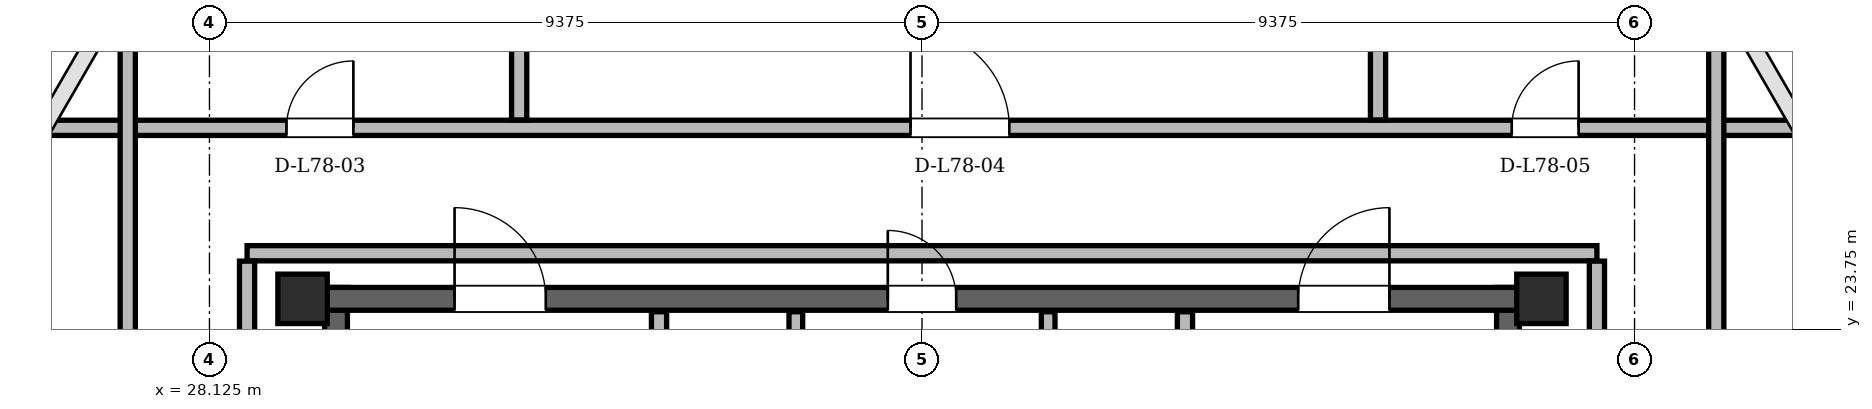
"""IFC4 building model, lengths in metres.
Left out: names, types, materials, properties, quantities, classifications, styles, units other than length and angle.
Written with IfcOpenShell. Run it as: python <this file> out.ifc"""

import sys

from ifc_helpers import new_model, si_unit, direction, frame, frame_2d, origin, origin_2d, place, context, subcontext, project, spatial, rectangle, hollow_rectangle, extrude, element, fill, save


model = new_model("IFC4")
c1 = context("Model", 3, precision=1e-05, world=origin(), true_north=direction((0.0, 1.0)))
c2 = subcontext(c1, "Body", "Model", "MODEL_VIEW")
j1 = project(units=[si_unit("LENGTHUNIT", "METRE"), si_unit("PLANEANGLEUNIT", "RADIAN")], contexts=[c1])
p1 = place(None, origin())
s1 = spatial("IfcSite", under=j1, at=p1, CompositionType="ELEMENT")
p2 = place(p1, origin())
s2 = spatial("IfcBuilding", under=s1, at=p2, CompositionType="ELEMENT")
p3 = place(p2, frame((0.0, 0.0, 296.7)))
s3 = spatial("IfcBuildingStorey", under=s2, at=p3, CompositionType="ELEMENT", Elevation=296.7)
for number, where, z_axis, x_axis in (
    (1, (45.65, 24.15, 0.0), (0.0, 0.0, 1.0), (1.0, 0.0, 0.0)),
    (2, (29.35, 24.15, 0.0), (0.0, 0.0, 1.0), (1.0, 0.0, 0.0)),
):
    element("IfcColumn", number, at=place(p3, frame(where, z_axis=z_axis, x_axis=x_axis)), inside=s3, PredefinedType="COLUMN", context=c2, shape_type="SweptSolid", body=[
        extrude(hollow_rectangle(XDim=0.65, YDim=0.65, WallThickness=0.05, at=origin_2d()), origin(), (0.0, 0.0, 1.0), 4.5),
    ])
for number, where, z_axis, x_axis in (
    (3, (29.79, 11.0, 0.0), (0.0, 0.0, 1.0), (0.0, 1.0, 0.0)),
    (4, (45.21, 11.0, 0.0), (0.0, 0.0, 1.0), (0.0, 1.0, 0.0)),
):
    element("IfcWall", number, at=place(p3, frame(where, z_axis=z_axis, x_axis=x_axis)), inside=s3, PredefinedType="SHEAR", context=c2, shape_type="SweptSolid", body=[
        extrude(rectangle(XDim=13.3, YDim=0.3, at=frame_2d((6.65, 0.0))), origin(), (0.0, 0.0, 1.0), 4.28),
    ])
p4 = place(p3, frame((29.65, 24.15, 0.0), z_axis=(0.0, 0.0, 1.0), x_axis=(1.0, 0.0, 0.0)))
e5 = element("IfcWall", 5, at=p4, inside=s3, PredefinedType="SHEAR", context=c2, shape_type="SweptSolid", body=[
    extrude(rectangle(XDim=15.7, YDim=0.3, at=frame_2d((7.85, 0.0))), origin(), (0.0, 0.0, 1.0), 4.28),
])
p5 = place(p4, frame((1.7, 0.0, 0.0)))
e6 = element("IfcOpeningElement", 6, at=p5, cuts=e5, PredefinedType="OPENING", context=c2, shape_type="SweptSolid", body=[
    extrude(rectangle(XDim=1.2, YDim=2.2, at=frame_2d((0.6, 1.1))), frame((0.0, 0.15, 0.0), z_axis=(0.0, -1.0, 0.0), x_axis=(1.0, 0.0, 0.0)), (0.0, 0.0, 1.0), 0.3),
])
p6 = place(p4, frame((12.8, 0.0, 0.0)))
e7 = element("IfcOpeningElement", 7, at=p6, cuts=e5, PredefinedType="OPENING", context=c2, shape_type="SweptSolid", body=[
    extrude(rectangle(XDim=1.2, YDim=2.2, at=frame_2d((0.6, 1.1))), frame((0.0, 0.15, 0.0), z_axis=(0.0, -1.0, 0.0), x_axis=(1.0, 0.0, 0.0)), (0.0, 0.0, 1.0), 0.3),
])
p7 = place(p4, frame((7.4, 0.0, 0.0)))
e8 = element("IfcOpeningElement", 8, at=p7, cuts=e5, PredefinedType="OPENING", context=c2, shape_type="SweptSolid", body=[
    extrude(rectangle(XDim=0.9, YDim=2.05, at=frame_2d((0.45, 1.025))), frame((0.0, 0.15, 0.0), z_axis=(0.0, -1.0, 0.0), x_axis=(1.0, 0.0, 0.0)), (0.0, 0.0, 1.0), 0.3),
])
p8 = place(p3, frame((34.04, 19.48, 0.0), z_axis=(0.0, 0.0, 1.0), x_axis=(0.0, 1.0, 0.0)))
e9 = element("IfcWall", 9, at=p8, inside=s3, PredefinedType="PARTITIONING", context=c2, shape_type="SweptSolid", body=[
    extrude(rectangle(XDim=4.5, YDim=0.2, at=frame_2d((2.25, 0.0))), origin(), (0.0, 0.0, 1.0), 4.28),
])
p9 = place(p8, frame((2.12, 0.0, 0.0)))
e10 = element("IfcOpeningElement", 10, at=p9, cuts=e9, PredefinedType="OPENING", context=c2, shape_type="SweptSolid", body=[
    extrude(rectangle(XDim=1.1, YDim=2.2, at=frame_2d((0.55, 1.1))), frame((0.0, 0.1, 0.0), z_axis=(0.0, -1.0, 0.0), x_axis=(1.0, 0.0, 0.0)), (0.0, 0.0, 1.0), 0.2),
])
p10 = place(p3, frame((35.84, 20.96, 0.0), z_axis=(0.0, 0.0, 1.0), x_axis=(0.0, 1.0, 0.0)))
e11 = element("IfcWall", 11, at=p10, inside=s3, PredefinedType="PARTITIONING", context=c2, shape_type="SweptSolid", body=[
    extrude(rectangle(XDim=3.02, YDim=0.18, at=frame_2d((1.51, 0.0))), origin(), (0.0, 0.0, 1.0), 4.28),
])
p11 = place(p3, frame((40.96, 19.48, 0.0), z_axis=(0.0, 0.0, 1.0), x_axis=(0.0, 1.0, 0.0)))
e12 = element("IfcWall", 12, at=p11, inside=s3, PredefinedType="PARTITIONING", context=c2, shape_type="SweptSolid", body=[
    extrude(rectangle(XDim=4.5, YDim=0.2, at=frame_2d((2.25, 0.0))), origin(), (0.0, 0.0, 1.0), 4.28),
])
p12 = place(p11, frame((2.12, 0.0, 0.0)))
e13 = element("IfcOpeningElement", 13, at=p12, cuts=e12, PredefinedType="OPENING", context=c2, shape_type="SweptSolid", body=[
    extrude(rectangle(XDim=1.1, YDim=2.2, at=frame_2d((0.55, 1.1))), frame((0.0, 0.1, 0.0), z_axis=(0.0, -1.0, 0.0), x_axis=(1.0, 0.0, 0.0)), (0.0, 0.0, 1.0), 0.2),
])
p13 = place(p3, frame((39.16, 20.96, 0.0), z_axis=(0.0, 0.0, 1.0), x_axis=(0.0, 1.0, 0.0)))
e14 = element("IfcWall", 14, at=p13, inside=s3, PredefinedType="PARTITIONING", context=c2, shape_type="SweptSolid", body=[
    extrude(rectangle(XDim=3.02, YDim=0.18, at=frame_2d((1.51, 0.0))), origin(), (0.0, 0.0, 1.0), 4.28),
])
p14 = place(p3, frame((28.62, 24.75, 0.0), z_axis=(0.0, 0.0, 1.0), x_axis=(1.0, 0.0, 0.0)))
e15 = element("IfcWall", 15, at=p14, inside=s3, PredefinedType="PARTITIONING", context=c2, shape_type="SweptSolid", body=[
    extrude(rectangle(XDim=17.76, YDim=0.2, at=frame_2d((8.88, 0.0))), origin(), (0.0, 0.0, 1.0), 3.866),
])
p15 = place(p3, frame((26.007, 26.4, 0.0), z_axis=(0.0, 0.0, 1.0), x_axis=(1.0, 0.0, 0.0)))
e16 = element("IfcWall", 16, at=p15, inside=s3, PredefinedType="PARTITIONING", context=c2, shape_type="SweptSolid", body=[
    extrude(rectangle(XDim=22.987, YDim=0.2, at=frame_2d((11.493, 0.0))), origin(), (0.0, 0.0, 1.0), 3.658),
])
p16 = place(p15, frame((3.132, 0.0, 0.0)))
e17 = element("IfcOpeningElement", 17, at=p16, cuts=e16, PredefinedType="OPENING", context=c2, shape_type="SweptSolid", body=[
    extrude(rectangle(XDim=0.88, YDim=2.08, at=frame_2d((0.44, 1.04))), frame((0.0, 0.1, 0.0), z_axis=(0.0, -1.0, 0.0), x_axis=(1.0, 0.0, 0.0)), (0.0, 0.0, 1.0), 0.2),
])
p17 = place(p15, frame((11.342, 0.0, 0.0)))
e18 = element("IfcOpeningElement", 18, at=p17, cuts=e16, PredefinedType="OPENING", context=c2, shape_type="SweptSolid", body=[
    extrude(rectangle(XDim=1.3, YDim=2.2, at=frame_2d((0.65, 1.1))), frame((0.0, 0.1, 0.0), z_axis=(0.0, -1.0, 0.0), x_axis=(1.0, 0.0, 0.0)), (0.0, 0.0, 1.0), 0.2),
])
p18 = place(p15, frame((19.252, 0.0, 0.0)))
e19 = element("IfcOpeningElement", 19, at=p18, cuts=e16, PredefinedType="OPENING", context=c2, shape_type="SweptSolid", body=[
    extrude(rectangle(XDim=0.88, YDim=2.08, at=frame_2d((0.44, 1.04))), frame((0.0, 0.1, 0.0), z_axis=(0.0, -1.0, 0.0), x_axis=(1.0, 0.0, 0.0)), (0.0, 0.0, 1.0), 0.2),
])
p19 = place(p3, frame((27.05, 8.854, 0.0), z_axis=(0.0, 0.0, 1.0), x_axis=(0.0, 1.0, 0.0)))
e20 = element("IfcWall", 20, at=p19, inside=s3, PredefinedType="PARTITIONING", context=c2, shape_type="SweptSolid", body=[
    extrude(rectangle(XDim=19.303, YDim=0.2, at=frame_2d((9.652, 0.0))), origin(), (0.0, 0.0, 1.0), 3.658),
])
p20 = place(p19, frame((5.396, 0.0, 0.0)))
e21 = element("IfcOpeningElement", 21, at=p20, cuts=e20, PredefinedType="OPENING", context=c2, shape_type="SweptSolid", body=[
    extrude(rectangle(XDim=1.3, YDim=2.2, at=frame_2d((0.65, 1.1))), frame((0.0, 0.1, 0.0), z_axis=(0.0, -1.0, 0.0), x_axis=(1.0, 0.0, 0.0)), (0.0, 0.0, 1.0), 0.2),
])
p21 = place(p19, frame((12.371, 0.0, 0.0)))
e22 = element("IfcOpeningElement", 22, at=p21, cuts=e20, PredefinedType="OPENING", context=c2, shape_type="SweptSolid", body=[
    extrude(rectangle(XDim=1.3, YDim=2.2, at=frame_2d((0.65, 1.1))), frame((0.0, 0.1, 0.0), z_axis=(0.0, -1.0, 0.0), x_axis=(1.0, 0.0, 0.0)), (0.0, 0.0, 1.0), 0.2),
])
p22 = place(p3, frame((28.62, 10.504, 0.0), z_axis=(0.0, 0.0, 1.0), x_axis=(0.0, 1.0, 0.0)))
e23 = element("IfcWall", 23, at=p22, inside=s3, PredefinedType="PARTITIONING", context=c2, shape_type="SweptSolid", body=[
    extrude(rectangle(XDim=14.142, YDim=0.2, at=frame_2d((7.071, 0.0))), origin(), (0.0, 0.0, 1.0), 3.866),
])
p23 = place(p3, frame((32.2, 26.504, 0.0), z_axis=(0.0, 0.0, 1.0), x_axis=(0.0, 1.0, 0.0)))
e24 = element("IfcWall", 24, at=p23, inside=s3, PredefinedType="PARTITIONING", context=c2, shape_type="SweptSolid", body=[
    extrude(rectangle(XDim=6.892, YDim=0.2, at=frame_2d((3.446, 0.0))), origin(), (0.0, 0.0, 1.0), 3.866),
])
p24 = place(p3, frame((43.5, 26.504, 0.0), z_axis=(0.0, 0.0, 1.0), x_axis=(0.0, 1.0, 0.0)))
e25 = element("IfcWall", 25, at=p24, inside=s3, PredefinedType="PARTITIONING", context=c2, shape_type="SweptSolid", body=[
    extrude(rectangle(XDim=3.592, YDim=0.2, at=frame_2d((1.796, 0.0))), origin(), (0.0, 0.0, 1.0), 4.28),
])
p25 = place(p3, frame((46.38, 10.504, 0.0), z_axis=(0.0, 0.0, 1.0), x_axis=(0.0, 1.0, 0.0)))
e26 = element("IfcWall", 26, at=p25, inside=s3, PredefinedType="PARTITIONING", context=c2, shape_type="SweptSolid", body=[
    extrude(rectangle(XDim=14.142, YDim=0.2, at=frame_2d((7.071, 0.0))), origin(), (0.0, 0.0, 1.0), 3.866),
])
p26 = place(p3, frame((47.95, 8.854, 0.0), z_axis=(0.0, 0.0, 1.0), x_axis=(0.0, 1.0, 0.0)))
e27 = element("IfcWall", 27, at=p26, inside=s3, PredefinedType="PARTITIONING", context=c2, shape_type="SweptSolid", body=[
    extrude(rectangle(XDim=19.303, YDim=0.2, at=frame_2d((9.652, 0.0))), origin(), (0.0, 0.0, 1.0), 3.658),
])
p27 = place(p26, frame((3.149, 0.0, 0.0)))
e28 = element("IfcOpeningElement", 28, at=p27, cuts=e27, PredefinedType="OPENING", context=c2, shape_type="SweptSolid", body=[
    extrude(rectangle(XDim=1.3, YDim=2.2, at=frame_2d((0.65, 1.1))), frame((0.0, 0.1, 0.0), z_axis=(0.0, -1.0, 0.0), x_axis=(1.0, 0.0, 0.0)), (0.0, 0.0, 1.0), 0.2),
])
p28 = place(p26, frame((10.27, 0.0, 0.0)))
e29 = element("IfcOpeningElement", 29, at=p28, cuts=e27, PredefinedType="OPENING", context=c2, shape_type="SweptSolid", body=[
    extrude(rectangle(XDim=1.3, YDim=2.2, at=frame_2d((0.65, 1.1))), frame((0.0, 0.1, 0.0), z_axis=(0.0, -1.0, 0.0), x_axis=(1.0, 0.0, 0.0)), (0.0, 0.0, 1.0), 0.2),
])
p29 = place(p5, origin())
e30 = element("IfcDoor", 30, at=p29, inside=s3, OperationType="SINGLE_SWING_LEFT", PredefinedType="DOOR", context=c2, shape_type="SweptSolid", body=[
    extrude(rectangle(XDim=1.2, YDim=2.2, at=frame_2d((0.6, 1.1))), frame((0.0, 0.025, 0.0), z_axis=(0.0, -1.0, 0.0), x_axis=(1.0, 0.0, 0.0)), (0.0, 0.0, 1.0), 0.05),
])
fill(e6, e30)
p30 = place(p6, origin())
e31 = element("IfcDoor", 31, at=p30, inside=s3, OperationType="SINGLE_SWING_RIGHT", PredefinedType="DOOR", context=c2, shape_type="SweptSolid", body=[
    extrude(rectangle(XDim=1.2, YDim=2.2, at=frame_2d((0.6, 1.1))), frame((0.0, 0.025, 0.0), z_axis=(0.0, -1.0, 0.0), x_axis=(1.0, 0.0, 0.0)), (0.0, 0.0, 1.0), 0.05),
])
fill(e7, e31)
p31 = place(p7, origin())
e32 = element("IfcDoor", 32, at=p31, inside=s3, OperationType="SINGLE_SWING_LEFT", PredefinedType="DOOR", context=c2, shape_type="SweptSolid", body=[
    extrude(rectangle(XDim=0.9, YDim=2.05, at=frame_2d((0.45, 1.025))), frame((0.0, 0.025, 0.0), z_axis=(0.0, -1.0, 0.0), x_axis=(1.0, 0.0, 0.0)), (0.0, 0.0, 1.0), 0.05),
])
fill(e8, e32)
p32 = place(p16, origin())
e33 = element("IfcDoor", 33, at=p32, inside=s3, OperationType="SINGLE_SWING_RIGHT", PredefinedType="DOOR", context=c2, shape_type="SweptSolid", body=[
    extrude(rectangle(XDim=0.88, YDim=2.08, at=frame_2d((0.44, 1.04))), frame((0.0, 0.025, 0.0), z_axis=(0.0, -1.0, 0.0), x_axis=(1.0, 0.0, 0.0)), (0.0, 0.0, 1.0), 0.05),
])
fill(e17, e33)
p33 = place(p17, origin())
e34 = element("IfcDoor", 34, at=p33, inside=s3, OperationType="SINGLE_SWING_LEFT", PredefinedType="DOOR", context=c2, shape_type="SweptSolid", body=[
    extrude(rectangle(XDim=1.3, YDim=2.2, at=frame_2d((0.65, 1.1))), frame((0.0, 0.025, 0.0), z_axis=(0.0, -1.0, 0.0), x_axis=(1.0, 0.0, 0.0)), (0.0, 0.0, 1.0), 0.05),
])
fill(e18, e34)
p34 = place(p18, origin())
e35 = element("IfcDoor", 35, at=p34, inside=s3, OperationType="SINGLE_SWING_RIGHT", PredefinedType="DOOR", context=c2, shape_type="SweptSolid", body=[
    extrude(rectangle(XDim=0.88, YDim=2.08, at=frame_2d((0.44, 1.04))), frame((0.0, 0.025, 0.0), z_axis=(0.0, -1.0, 0.0), x_axis=(1.0, 0.0, 0.0)), (0.0, 0.0, 1.0), 0.05),
])
fill(e19, e35)
save(model, sys.argv[1])
